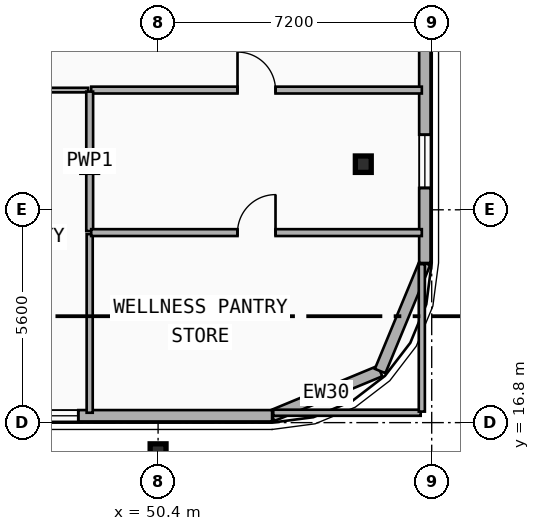
"""IFC4 building model, lengths in metres.
Left out: names, types, materials, properties, quantities, classifications, styles, units other than length and angle.
Written with IfcOpenShell. Run it as: python <this file> out.ifc"""

import sys

from ifc_helpers import new_model, si_unit, direction, frame, frame_2d, origin, origin_2d, place, context, subcontext, project, spatial, rectangle, i_section, extrude, element, fill, save


model = new_model("IFC4")
c1 = context("Model", 3, precision=1e-05, world=origin(), true_north=direction((0.0, 1.0)))
c2 = subcontext(c1, "Body", "Model", "MODEL_VIEW")
j1 = project(units=[si_unit("LENGTHUNIT", "METRE"), si_unit("PLANEANGLEUNIT", "RADIAN")], contexts=[c1])
p1 = place(None, origin())
s1 = spatial("IfcSite", under=j1, at=p1, CompositionType="ELEMENT")
p2 = place(p1, origin())
s2 = spatial("IfcBuilding", under=s1, at=p2, CompositionType="ELEMENT")
p3 = place(p2, frame((0.0, 0.0, 122.3)))
s3 = spatial("IfcBuildingStorey", under=s2, at=p3, CompositionType="ELEMENT", Elevation=122.3)
p4 = place(p3, frame((48.6, 23.6, 0.0), z_axis=(0.0, 0.0, 1.0), x_axis=(1.0, 0.0, 0.0)))
e1 = element("IfcColumn", 1, at=p4, inside=s3, PredefinedType="COLUMN", context=c2, shape_type="SweptSolid", body=[
    extrude(i_section(OverallWidth=0.418, OverallDepth=0.432, WebThickness=0.035, FlangeThickness=0.056, FilletRadius=0.015, at=origin_2d()), origin(), (0.0, 0.0, 1.0), 3.5),
])
p5 = place(p3, frame((50.4, 16.122, 0.0), z_axis=(0.0, -0.079891690793, 0.996803550226), x_axis=(1.0, 0.0, 0.0)))
e2 = element("IfcColumn", 2, at=p5, inside=s3, PredefinedType="COLUMN", context=c2, shape_type="SweptSolid", body=[
    extrude(i_section(OverallWidth=0.418, OverallDepth=0.432, WebThickness=0.035, FlangeThickness=0.056, FilletRadius=0.015, at=origin_2d()), origin(), (0.0, 0.0, 1.0), 3.511),
])
p6 = place(p3, frame((55.8, 23.6, 0.0), z_axis=(0.0, 0.0, 1.0), x_axis=(1.0, 0.0, 0.0)))
e3 = element("IfcColumn", 3, at=p6, inside=s3, PredefinedType="COLUMN", context=c2, shape_type="SweptSolid", body=[
    extrude(i_section(OverallWidth=0.418, OverallDepth=0.432, WebThickness=0.035, FlangeThickness=0.056, FilletRadius=0.015, at=origin_2d()), origin(), (0.0, 0.0, 1.0), 3.5),
])
p7 = place(p3, frame((56.243, 18.157, 0.0), z_axis=(0.0, 0.0, 1.0), x_axis=(-0.923882414032, -0.382676475685, 0.0)))
e4 = element("IfcWall", 4, at=p7, inside=s3, PredefinedType="SOLIDWALL", context=c2, shape_type="SweptSolid", body=[
    extrude(rectangle(XDim=3.077, YDim=0.3, at=frame_2d((1.539, 0.0))), origin(), (0.0, 0.0, 1.0), 3.24),
])
p8 = place(p3, frame((57.42, 21.0, 0.0), z_axis=(0.0, 0.0, 1.0), x_axis=(-0.382636798336, -0.92389884758, 0.0)))
e5 = element("IfcWall", 5, at=p8, inside=s3, PredefinedType="SOLIDWALL", context=c2, shape_type="SweptSolid", body=[
    extrude(rectangle(XDim=3.077, YDim=0.3, at=frame_2d((1.538, 0.0))), origin(), (0.0, 0.0, 1.0), 3.24),
])
p9 = place(p3, frame((57.42, 39.0, 0.0), z_axis=(0.0, 0.0, 1.0), x_axis=(0.0, -1.0, 0.0)))
e6 = element("IfcWall", 6, at=p9, inside=s3, PredefinedType="SOLIDWALL", context=c2, shape_type="SweptSolid", body=[
    extrude(rectangle(XDim=18.0, YDim=0.3, at=frame_2d((9.0, 0.0))), origin(), (0.0, 0.0, 1.0), 3.24),
])
p10 = place(p9, frame((8.882, 0.0, 0.48)))
e7 = element("IfcOpeningElement", 7, at=p10, cuts=e6, PredefinedType="OPENING", context=c2, shape_type="SweptSolid", body=[
    extrude(rectangle(XDim=1.4, YDim=1.8, at=frame_2d((0.7, 0.9))), frame((0.0, 0.16, 0.0), z_axis=(0.0, -1.0, 0.0), x_axis=(1.0, 0.0, 0.0)), (0.0, 0.0, 1.0), 0.32),
])
p11 = place(p9, frame((3.621, 0.0, 0.48)))
e8 = element("IfcOpeningElement", 8, at=p11, cuts=e6, PredefinedType="OPENING", context=c2, shape_type="SweptSolid", body=[
    extrude(rectangle(XDim=1.4, YDim=1.8, at=frame_2d((0.7, 0.9))), frame((0.0, 0.16, 0.0), z_axis=(0.0, -1.0, 0.0), x_axis=(1.0, 0.0, 0.0)), (0.0, 0.0, 1.0), 0.32),
])
p12 = place(p9, frame((14.625, 0.0, 0.48)))
e9 = element("IfcOpeningElement", 9, at=p12, cuts=e6, PredefinedType="OPENING", context=c2, shape_type="SweptSolid", body=[
    extrude(rectangle(XDim=1.4, YDim=1.8, at=frame_2d((0.7, 0.9))), frame((0.0, 0.16, 0.0), z_axis=(0.0, -1.0, 0.0), x_axis=(1.0, 0.0, 0.0)), (0.0, 0.0, 1.0), 0.32),
])
p13 = place(p3, frame((53.4, 16.98, 0.0), z_axis=(0.0, 0.0, 1.0), x_axis=(-1.0, 0.0, 0.0)))
e10 = element("IfcWall", 10, at=p13, inside=s3, PredefinedType="SOLIDWALL", context=c2, shape_type="SweptSolid", body=[
    extrude(rectangle(XDim=49.2, YDim=0.3, at=frame_2d((24.6, 0.0))), origin(), (0.0, 0.0, 1.0), 3.24),
])
p14 = place(p13, frame((41.962, 0.0, 0.8)))
e11 = element("IfcOpeningElement", 11, at=p14, cuts=e10, PredefinedType="OPENING", context=c2, shape_type="SweptSolid", body=[
    extrude(rectangle(XDim=1.6, YDim=1.95, at=frame_2d((0.8, 0.975))), frame((0.0, 0.16, 0.0), z_axis=(0.0, -1.0, 0.0), x_axis=(1.0, 0.0, 0.0)), (0.0, 0.0, 1.0), 0.32),
])
p15 = place(p13, frame((39.5, 0.0, 0.34)))
e12 = element("IfcOpeningElement", 12, at=p15, cuts=e10, PredefinedType="OPENING", context=c2, shape_type="SweptSolid", body=[
    extrude(rectangle(XDim=1.4, YDim=1.8, at=frame_2d((0.7, 0.9))), frame((0.0, 0.16, 0.0), z_axis=(0.0, -1.0, 0.0), x_axis=(1.0, 0.0, 0.0)), (0.0, 0.0, 1.0), 0.32),
])
p16 = place(p13, frame((28.7, 0.0, 0.65)))
e13 = element("IfcOpeningElement", 13, at=p16, cuts=e10, PredefinedType="OPENING", context=c2, shape_type="SweptSolid", body=[
    extrude(rectangle(XDim=1.6, YDim=1.95, at=frame_2d((0.8, 0.975))), frame((0.0, 0.16, 0.0), z_axis=(0.0, -1.0, 0.0), x_axis=(1.0, 0.0, 0.0)), (0.0, 0.0, 1.0), 0.32),
])
p17 = place(p13, frame((5.1, 0.0, 0.8)))
e14 = element("IfcOpeningElement", 14, at=p17, cuts=e10, PredefinedType="OPENING", context=c2, shape_type="SweptSolid", body=[
    extrude(rectangle(XDim=1.6, YDim=1.95, at=frame_2d((0.8, 0.975))), frame((0.0, 0.16, 0.0), z_axis=(0.0, -1.0, 0.0), x_axis=(1.0, 0.0, 0.0)), (0.0, 0.0, 1.0), 0.32),
])
p18 = place(p3, frame((38.39, 25.55, 0.0), z_axis=(0.0, 0.0, 1.0), x_axis=(1.0, 0.0, 0.0)))
e15 = element("IfcWall", 15, at=p18, inside=s3, PredefinedType="PARTITIONING", context=c2, shape_type="SweptSolid", body=[
    extrude(rectangle(XDim=10.17, YDim=0.12, at=frame_2d((5.085, 0.0))), origin(), (0.0, 0.0, 1.0), 2.406),
])
p19 = place(p18, frame((4.635, 0.0, 0.0)))
e16 = element("IfcOpeningElement", 16, at=p19, cuts=e15, PredefinedType="OPENING", context=c2, shape_type="SweptSolid", body=[
    extrude(rectangle(XDim=0.9, YDim=2.1, at=frame_2d((0.45, 1.05))), frame((0.0, 0.07, 0.0), z_axis=(0.0, -1.0, 0.0), x_axis=(1.0, 0.0, 0.0)), (0.0, 0.0, 1.0), 0.14),
])
p20 = place(p3, frame((48.64, 25.55, 0.0), z_axis=(0.0, 0.0, 1.0), x_axis=(1.0, 0.0, 0.0)))
e17 = element("IfcWall", 17, at=p20, inside=s3, PredefinedType="PLUMBINGWALL", context=c2, shape_type="SweptSolid", body=[
    extrude(rectangle(XDim=8.7, YDim=0.18, at=frame_2d((4.35, 0.0))), origin(), (0.0, 0.0, 1.0), 2.57),
])
p21 = place(p20, frame((3.85, 0.0, 0.0)))
e18 = element("IfcOpeningElement", 18, at=p21, cuts=e17, PredefinedType="OPENING", context=c2, shape_type="SweptSolid", body=[
    extrude(rectangle(XDim=1.0, YDim=2.15, at=frame_2d((0.5, 1.075))), frame((0.0, 0.1, 0.0), z_axis=(0.0, -1.0, 0.0), x_axis=(1.0, 0.0, 0.0)), (0.0, 0.0, 1.0), 0.2),
])
p22 = place(p3, frame((48.6, 21.84, 0.0), z_axis=(0.0, 0.0, 1.0), x_axis=(0.0, 1.0, 0.0)))
e19 = element("IfcWall", 19, at=p22, inside=s3, PredefinedType="PLUMBINGWALL", context=c2, shape_type="SweptSolid", body=[
    extrude(rectangle(XDim=3.67, YDim=0.18, at=frame_2d((1.835, 0.0))), origin(), (0.0, 0.0, 1.0), 2.72),
])
p23 = place(p3, frame((48.6, 17.06, 0.0), z_axis=(0.0, 0.0, 1.0), x_axis=(0.0, 1.0, 0.0)))
e20 = element("IfcWall", 20, at=p23, inside=s3, PredefinedType="PARTITIONING", context=c2, shape_type="SweptSolid", body=[
    extrude(rectangle(XDim=4.7, YDim=0.16, at=frame_2d((2.35, 0.0))), origin(), (0.0, 0.0, 1.0), 2.72),
])
p24 = place(p3, frame((48.64, 21.8, 0.0), z_axis=(0.0, 0.0, 1.0), x_axis=(1.0, 0.0, 0.0)))
e21 = element("IfcWall", 21, at=p24, inside=s3, PredefinedType="PLUMBINGWALL", context=c2, shape_type="SweptSolid", body=[
    extrude(rectangle(XDim=8.7, YDim=0.18, at=frame_2d((4.35, 0.0))), origin(), (0.0, 0.0, 1.0), 2.57),
])
p25 = place(p24, frame((3.85, 0.0, 0.0)))
e22 = element("IfcOpeningElement", 22, at=p25, cuts=e21, PredefinedType="OPENING", context=c2, shape_type="SweptSolid", body=[
    extrude(rectangle(XDim=1.0, YDim=2.15, at=frame_2d((0.5, 1.075))), frame((0.0, 0.1, 0.0), z_axis=(0.0, -1.0, 0.0), x_axis=(1.0, 0.0, 0.0)), (0.0, 0.0, 1.0), 0.2),
])
p26 = place(p3, frame((53.43, 17.06, 0.0), z_axis=(0.0, 0.0, 1.0), x_axis=(1.0, 0.0, 0.0)))
e23 = element("IfcWall", 23, at=p26, inside=s3, PredefinedType="PARTITIONING", context=c2, shape_type="SweptSolid", body=[
    extrude(rectangle(XDim=3.88, YDim=0.16, at=frame_2d((1.94, 0.0))), origin(), (0.0, 0.0, 1.0), 2.72),
])
p27 = place(p3, frame((57.34, 17.09, 0.0), z_axis=(0.0, 0.0, 1.0), x_axis=(0.0, 1.0, 0.0)))
e24 = element("IfcWall", 24, at=p27, inside=s3, PredefinedType="PARTITIONING", context=c2, shape_type="SweptSolid", body=[
    extrude(rectangle(XDim=3.88, YDim=0.16, at=frame_2d((1.94, 0.0))), origin(), (0.0, 0.0, 1.0), 3.24),
])
p28 = place(p12, origin())
e25 = element("IfcWindow", 25, at=p28, inside=s3, PartitioningType="SINGLE_PANEL", PredefinedType="WINDOW", context=c2, shape_type="SweptSolid", body=[
    extrude(rectangle(XDim=1.4, YDim=1.8, at=frame_2d((0.7, 0.9))), frame((0.0, 0.03, 0.0), z_axis=(0.0, -1.0, 0.0), x_axis=(1.0, 0.0, 0.0)), (0.0, 0.0, 1.0), 0.06),
])
fill(e9, e25)
p29 = place(p17, origin())
e26 = element("IfcWindow", 26, at=p29, inside=s3, PartitioningType="SINGLE_PANEL", PredefinedType="WINDOW", context=c2, shape_type="SweptSolid", body=[
    extrude(rectangle(XDim=1.6, YDim=1.95, at=frame_2d((0.8, 0.975))), frame((0.0, 0.03, 0.0), z_axis=(0.0, -1.0, 0.0), x_axis=(1.0, 0.0, 0.0)), (0.0, 0.0, 1.0), 0.06),
])
fill(e14, e26)
p30 = place(p21, origin())
e27 = element("IfcDoor", 27, at=p30, inside=s3, OperationType="SINGLE_SWING_LEFT", PredefinedType="DOOR", context=c2, shape_type="SweptSolid", body=[
    extrude(rectangle(XDim=1.0, YDim=2.15, at=frame_2d((0.5, 1.075))), frame((0.0, 0.025, 0.0), z_axis=(0.0, -1.0, 0.0), x_axis=(1.0, 0.0, 0.0)), (0.0, 0.0, 1.0), 0.05),
])
fill(e18, e27)
p31 = place(p25, origin())
e28 = element("IfcDoor", 28, at=p31, inside=s3, OperationType="SINGLE_SWING_RIGHT", PredefinedType="DOOR", context=c2, shape_type="SweptSolid", body=[
    extrude(rectangle(XDim=1.0, YDim=2.15, at=frame_2d((0.5, 1.075))), frame((0.0, 0.025, 0.0), z_axis=(0.0, -1.0, 0.0), x_axis=(1.0, 0.0, 0.0)), (0.0, 0.0, 1.0), 0.05),
])
fill(e22, e28)
save(model, sys.argv[1])
